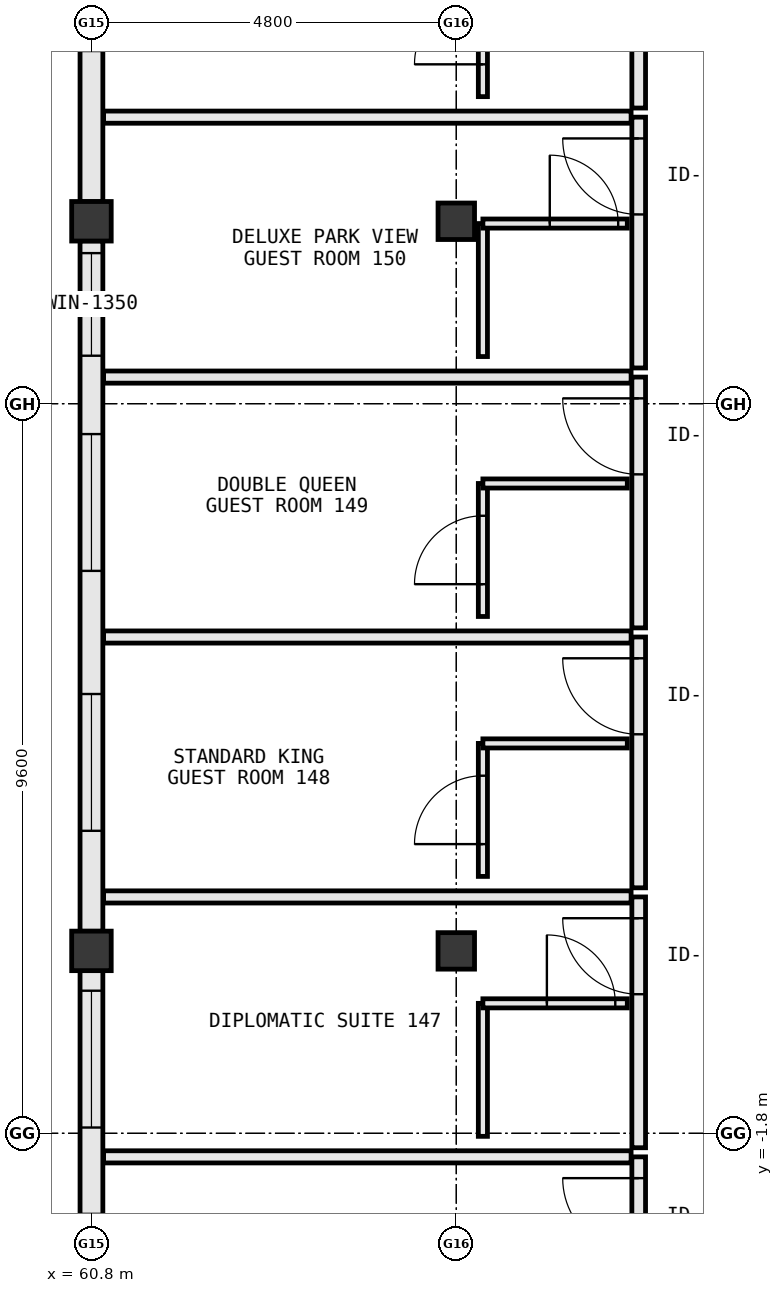
"""IFC4 building model, lengths in metres.
Left out: names, types, materials, properties, quantities, classifications, styles, units other than length and angle.
Written with IfcOpenShell. Run it as: python <this file> out.ifc"""

import sys

from ifc_helpers import new_model, si_unit, direction, frame, frame_2d, origin, origin_2d, place, context, subcontext, project, spatial, rectangle, extrude, element, fill, save


model = new_model("IFC4")
c1 = context("Model", 3, precision=1e-05, world=origin(), true_north=direction((0.0, 1.0)))
c2 = subcontext(c1, "Body", "Model", "MODEL_VIEW")
j1 = project(units=[si_unit("LENGTHUNIT", "METRE"), si_unit("PLANEANGLEUNIT", "RADIAN")], contexts=[c1])
p1 = place(None, origin())
s1 = spatial("IfcSite", under=j1, at=p1, CompositionType="ELEMENT")
p2 = place(p1, origin())
s2 = spatial("IfcBuilding", under=s1, at=p2, CompositionType="ELEMENT")
p3 = place(p2, frame((0.0, 0.0, 23.8)))
s3 = spatial("IfcBuildingStorey", under=s2, at=p3, CompositionType="ELEMENT", Elevation=23.8)
for number, where, z_axis, x_axis in (
    (1, (60.8, 0.6, 0.0), (0.0, 0.0, 1.0), (1.0, 0.0, 0.0)),
    (2, (60.8, 10.2, 0.0), (0.0, 0.0, 1.0), (1.0, 0.0, 0.0)),
):
    element("IfcColumn", number, at=place(p3, frame(where, z_axis=z_axis, x_axis=x_axis)), inside=s3, PredefinedType="COLUMN", context=c2, shape_type="SweptSolid", body=[
        extrude(rectangle(XDim=0.52, YDim=0.52, at=origin_2d()), origin(), (0.0, 0.0, 1.0), 3.8),
    ])
for number, where, z_axis, x_axis in (
    (3, (65.6, 0.6, 0.0), (0.0, 0.0, 1.0), (1.0, 0.0, 0.0)),
    (4, (65.6, 10.2, 0.0), (0.0, 0.0, 1.0), (1.0, 0.0, 0.0)),
):
    element("IfcColumn", number, at=place(p3, frame(where, z_axis=z_axis, x_axis=x_axis)), inside=s3, PredefinedType="COLUMN", context=c2, shape_type="SweptSolid", body=[
        extrude(rectangle(XDim=0.48, YDim=0.48, at=origin_2d()), origin(), (0.0, 0.0, 1.0), 3.8),
    ])
p4 = place(p3, frame((60.8, 18.342, 0.0), z_axis=(0.0, 0.0, 1.0), x_axis=(0.0, -1.0, 0.0)))
e5 = element("IfcWall", 5, at=p4, inside=s3, PredefinedType="STANDARD", context=c2, shape_type="SweptSolid", body=[
    extrude(rectangle(XDim=7.884, YDim=0.3, at=frame_2d((3.942, 0.0))), origin(), (0.0, 0.0, 1.0), 3.005),
])
p5 = place(p4, frame((4.102, 0.0, 0.85)))
e6 = element("IfcOpeningElement", 6, at=p5, cuts=e5, PredefinedType="OPENING", context=c2, shape_type="SweptSolid", body=[
    extrude(rectangle(XDim=1.8, YDim=1.85, at=frame_2d((0.9, 0.925))), frame((0.0, 0.162, 0.0), z_axis=(0.0, -1.0, 0.0), x_axis=(1.0, 0.0, 0.0)), (0.0, 0.0, 1.0), 0.324),
])
p6 = place(p4, frame((0.716, 0.0, 0.85)))
e7 = element("IfcOpeningElement", 7, at=p6, cuts=e5, PredefinedType="OPENING", context=c2, shape_type="SweptSolid", body=[
    extrude(rectangle(XDim=1.8, YDim=1.85, at=frame_2d((0.9, 0.925))), frame((0.0, 0.162, 0.0), z_axis=(0.0, -1.0, 0.0), x_axis=(1.0, 0.0, 0.0)), (0.0, 0.0, 1.0), 0.324),
])
p7 = place(p3, frame((60.8, 9.942, 0.0), z_axis=(0.0, 0.0, 1.0), x_axis=(0.0, -1.0, 0.0)))
e8 = element("IfcWall", 8, at=p7, inside=s3, PredefinedType="STANDARD", context=c2, shape_type="SweptSolid", body=[
    extrude(rectangle(XDim=9.084, YDim=0.3, at=frame_2d((4.542, 0.0))), origin(), (0.0, 0.0, 1.0), 2.905),
])
p8 = place(p7, frame((5.962, 0.0, 0.85)))
e9 = element("IfcOpeningElement", 9, at=p8, cuts=e8, PredefinedType="OPENING", context=c2, shape_type="SweptSolid", body=[
    extrude(rectangle(XDim=1.8, YDim=1.85, at=frame_2d((0.9, 0.925))), frame((0.0, 0.162, 0.0), z_axis=(0.0, -1.0, 0.0), x_axis=(1.0, 0.0, 0.0)), (0.0, 0.0, 1.0), 0.324),
])
p9 = place(p7, frame((2.542, 0.0, 0.85)))
e10 = element("IfcOpeningElement", 10, at=p9, cuts=e8, PredefinedType="OPENING", context=c2, shape_type="SweptSolid", body=[
    extrude(rectangle(XDim=1.8, YDim=1.85, at=frame_2d((0.9, 0.925))), frame((0.0, 0.162, 0.0), z_axis=(0.0, -1.0, 0.0), x_axis=(1.0, 0.0, 0.0)), (0.0, 0.0, 1.0), 0.324),
])
p10 = place(p7, frame((0.161, 0.0, 0.85)))
e11 = element("IfcOpeningElement", 11, at=p10, cuts=e8, PredefinedType="OPENING", context=c2, shape_type="SweptSolid", body=[
    extrude(rectangle(XDim=1.35, YDim=1.65, at=frame_2d((0.675, 0.825))), frame((0.0, 0.162, 0.0), z_axis=(0.0, -1.0, 0.0), x_axis=(1.0, 0.0, 0.0)), (0.0, 0.0, 1.0), 0.324),
])
p11 = place(p3, frame((60.8, 0.342, 0.0), z_axis=(0.0, 0.0, 1.0), x_axis=(0.0, -1.0, 0.0)))
e12 = element("IfcWall", 12, at=p11, inside=s3, PredefinedType="STANDARD", context=c2, shape_type="SweptSolid", body=[
    extrude(rectangle(XDim=9.084, YDim=0.3, at=frame_2d((4.542, 0.0))), origin(), (0.0, 0.0, 1.0), 2.905),
])
p12 = place(p11, frame((6.578, 0.0, 0.85)))
e13 = element("IfcOpeningElement", 13, at=p12, cuts=e12, PredefinedType="OPENING", context=c2, shape_type="SweptSolid", body=[
    extrude(rectangle(XDim=1.8, YDim=1.85, at=frame_2d((0.9, 0.925))), frame((0.0, 0.162, 0.0), z_axis=(0.0, -1.0, 0.0), x_axis=(1.0, 0.0, 0.0)), (0.0, 0.0, 1.0), 0.324),
])
p13 = place(p11, frame((3.202, 0.0, 0.85)))
e14 = element("IfcOpeningElement", 14, at=p13, cuts=e12, PredefinedType="OPENING", context=c2, shape_type="SweptSolid", body=[
    extrude(rectangle(XDim=1.8, YDim=1.85, at=frame_2d((0.9, 0.925))), frame((0.0, 0.162, 0.0), z_axis=(0.0, -1.0, 0.0), x_axis=(1.0, 0.0, 0.0)), (0.0, 0.0, 1.0), 0.324),
])
p14 = place(p11, frame((0.266, 0.0, 0.85)))
e15 = element("IfcOpeningElement", 15, at=p14, cuts=e12, PredefinedType="OPENING", context=c2, shape_type="SweptSolid", body=[
    extrude(rectangle(XDim=1.8, YDim=1.85, at=frame_2d((0.9, 0.925))), frame((0.0, 0.162, 0.0), z_axis=(0.0, -1.0, 0.0), x_axis=(1.0, 0.0, 0.0)), (0.0, 0.0, 1.0), 0.324),
])
p15 = place(p3, frame((68.0, -5.41, 0.0), z_axis=(0.0, 0.0, 1.0), x_axis=(0.0, 1.0, 0.0)))
e16 = element("IfcWall", 16, at=p15, inside=s3, PredefinedType="PARTITIONING", context=c2, shape_type="SweptSolid", body=[
    extrude(rectangle(XDim=3.3, YDim=0.18, at=frame_2d((1.65, 0.0))), origin(), (0.0, 0.0, 1.0), 3.55),
])
p16 = place(p15, frame((2.02, 0.0, 0.0)))
e17 = element("IfcOpeningElement", 17, at=p16, cuts=e16, PredefinedType="OPENING", context=c2, shape_type="SweptSolid", body=[
    extrude(rectangle(XDim=1.0, YDim=2.2, at=frame_2d((0.5, 1.1))), frame((0.0, 0.102, 0.0), z_axis=(0.0, -1.0, 0.0), x_axis=(1.0, 0.0, 0.0)), (0.0, 0.0, 1.0), 0.204),
])
p17 = place(p3, frame((60.96, -2.11, 0.0), z_axis=(0.0, 0.0, 1.0), x_axis=(1.0, 0.0, 0.0)))
e18 = element("IfcWall", 18, at=p17, inside=s3, PredefinedType="PARTITIONING", context=c2, shape_type="SweptSolid", body=[
    extrude(rectangle(XDim=6.94, YDim=0.16, at=frame_2d((3.47, 0.0))), origin(), (0.0, 0.0, 1.0), 3.55),
])
p18 = place(p3, frame((68.0, -1.99, 0.0), z_axis=(0.0, 0.0, 1.0), x_axis=(0.0, 1.0, 0.0)))
e19 = element("IfcWall", 19, at=p18, inside=s3, PredefinedType="PARTITIONING", context=c2, shape_type="SweptSolid", body=[
    extrude(rectangle(XDim=3.3, YDim=0.18, at=frame_2d((1.65, 0.0))), origin(), (0.0, 0.0, 1.0), 3.55),
])
p19 = place(p18, frame((2.02, 0.0, 0.0)))
e20 = element("IfcOpeningElement", 20, at=p19, cuts=e19, PredefinedType="OPENING", context=c2, shape_type="SweptSolid", body=[
    extrude(rectangle(XDim=1.0, YDim=2.2, at=frame_2d((0.5, 1.1))), frame((0.0, 0.102, 0.0), z_axis=(0.0, -1.0, 0.0), x_axis=(1.0, 0.0, 0.0)), (0.0, 0.0, 1.0), 0.204),
])
p20 = place(p3, frame((60.96, 1.31, 0.0), z_axis=(0.0, 0.0, 1.0), x_axis=(1.0, 0.0, 0.0)))
e21 = element("IfcWall", 21, at=p20, inside=s3, PredefinedType="PARTITIONING", context=c2, shape_type="SweptSolid", body=[
    extrude(rectangle(XDim=6.94, YDim=0.16, at=frame_2d((3.47, 0.0))), origin(), (0.0, 0.0, 1.0), 3.55),
])
p21 = place(p3, frame((65.95, -1.84, 0.0), z_axis=(0.0, 0.0, 1.0), x_axis=(0.0, 1.0, 0.0)))
e22 = element("IfcWall", 22, at=p21, inside=s3, PredefinedType="PARTITIONING", context=c2, shape_type="SweptSolid", body=[
    extrude(rectangle(XDim=1.75, YDim=0.12, at=frame_2d((0.875, 0.0))), origin(), (0.0, 0.0, 1.0), 2.905),
])
p22 = place(p3, frame((65.95, -0.09, 0.0), z_axis=(0.0, 0.0, 1.0), x_axis=(1.0, 0.0, 0.0)))
e23 = element("IfcWall", 23, at=p22, inside=s3, PredefinedType="PARTITIONING", context=c2, shape_type="SweptSolid", body=[
    extrude(rectangle(XDim=1.9, YDim=0.12, at=frame_2d((0.95, 0.0))), origin(), (0.0, 0.0, 1.0), 3.55),
])
p23 = place(p22, frame((0.842, 0.0, 0.0)))
e24 = element("IfcOpeningElement", 24, at=p23, cuts=e23, PredefinedType="OPENING", context=c2, shape_type="SweptSolid", body=[
    extrude(rectangle(XDim=0.9, YDim=2.15, at=frame_2d((0.45, 1.075))), frame((0.0, 0.072, 0.0), z_axis=(0.0, -1.0, 0.0), x_axis=(1.0, 0.0, 0.0)), (0.0, 0.0, 1.0), 0.144),
])
p24 = place(p3, frame((68.0, 1.43, 0.0), z_axis=(0.0, 0.0, 1.0), x_axis=(0.0, 1.0, 0.0)))
e25 = element("IfcWall", 25, at=p24, inside=s3, PredefinedType="PARTITIONING", context=c2, shape_type="SweptSolid", body=[
    extrude(rectangle(XDim=3.3, YDim=0.18, at=frame_2d((1.65, 0.0))), origin(), (0.0, 0.0, 1.0), 3.55),
])
p25 = place(p24, frame((2.02, 0.0, 0.0)))
e26 = element("IfcOpeningElement", 26, at=p25, cuts=e25, PredefinedType="OPENING", context=c2, shape_type="SweptSolid", body=[
    extrude(rectangle(XDim=1.0, YDim=2.2, at=frame_2d((0.5, 1.1))), frame((0.0, 0.102, 0.0), z_axis=(0.0, -1.0, 0.0), x_axis=(1.0, 0.0, 0.0)), (0.0, 0.0, 1.0), 0.204),
])
p26 = place(p3, frame((60.96, 4.73, 0.0), z_axis=(0.0, 0.0, 1.0), x_axis=(1.0, 0.0, 0.0)))
e27 = element("IfcWall", 27, at=p26, inside=s3, PredefinedType="PARTITIONING", context=c2, shape_type="SweptSolid", body=[
    extrude(rectangle(XDim=6.94, YDim=0.16, at=frame_2d((3.47, 0.0))), origin(), (0.0, 0.0, 1.0), 3.55),
])
p27 = place(p3, frame((65.95, 1.58, 0.0), z_axis=(0.0, 0.0, 1.0), x_axis=(0.0, 1.0, 0.0)))
e28 = element("IfcWall", 28, at=p27, inside=s3, PredefinedType="PARTITIONING", context=c2, shape_type="SweptSolid", body=[
    extrude(rectangle(XDim=1.75, YDim=0.12, at=frame_2d((0.875, 0.0))), origin(), (0.0, 0.0, 1.0), 2.905),
])
p28 = place(p27, frame((0.425, 0.0, 0.0)))
e29 = element("IfcOpeningElement", 29, at=p28, cuts=e28, PredefinedType="OPENING", context=c2, shape_type="SweptSolid", body=[
    extrude(rectangle(XDim=0.9, YDim=2.15, at=frame_2d((0.45, 1.075))), frame((0.0, 0.072, 0.0), z_axis=(0.0, -1.0, 0.0), x_axis=(1.0, 0.0, 0.0)), (0.0, 0.0, 1.0), 0.144),
])
p29 = place(p3, frame((65.95, 3.33, 0.0), z_axis=(0.0, 0.0, 1.0), x_axis=(1.0, 0.0, 0.0)))
e30 = element("IfcWall", 30, at=p29, inside=s3, PredefinedType="PARTITIONING", context=c2, shape_type="SweptSolid", body=[
    extrude(rectangle(XDim=1.9, YDim=0.12, at=frame_2d((0.95, 0.0))), origin(), (0.0, 0.0, 1.0), 3.55),
])
p30 = place(p3, frame((68.0, 4.85, 0.0), z_axis=(0.0, 0.0, 1.0), x_axis=(0.0, 1.0, 0.0)))
e31 = element("IfcWall", 31, at=p30, inside=s3, PredefinedType="PARTITIONING", context=c2, shape_type="SweptSolid", body=[
    extrude(rectangle(XDim=3.3, YDim=0.18, at=frame_2d((1.65, 0.0))), origin(), (0.0, 0.0, 1.0), 3.55),
])
p31 = place(p30, frame((2.02, 0.0, 0.0)))
e32 = element("IfcOpeningElement", 32, at=p31, cuts=e31, PredefinedType="OPENING", context=c2, shape_type="SweptSolid", body=[
    extrude(rectangle(XDim=1.0, YDim=2.2, at=frame_2d((0.5, 1.1))), frame((0.0, 0.102, 0.0), z_axis=(0.0, -1.0, 0.0), x_axis=(1.0, 0.0, 0.0)), (0.0, 0.0, 1.0), 0.204),
])
p32 = place(p3, frame((60.96, 8.15, 0.0), z_axis=(0.0, 0.0, 1.0), x_axis=(1.0, 0.0, 0.0)))
e33 = element("IfcWall", 33, at=p32, inside=s3, PredefinedType="PARTITIONING", context=c2, shape_type="SweptSolid", body=[
    extrude(rectangle(XDim=6.94, YDim=0.16, at=frame_2d((3.47, 0.0))), origin(), (0.0, 0.0, 1.0), 3.55),
])
p33 = place(p3, frame((65.95, 5.0, 0.0), z_axis=(0.0, 0.0, 1.0), x_axis=(0.0, 1.0, 0.0)))
e34 = element("IfcWall", 34, at=p33, inside=s3, PredefinedType="PARTITIONING", context=c2, shape_type="SweptSolid", body=[
    extrude(rectangle(XDim=1.75, YDim=0.12, at=frame_2d((0.875, 0.0))), origin(), (0.0, 0.0, 1.0), 2.905),
])
p34 = place(p33, frame((0.425, 0.0, 0.0)))
e35 = element("IfcOpeningElement", 35, at=p34, cuts=e34, PredefinedType="OPENING", context=c2, shape_type="SweptSolid", body=[
    extrude(rectangle(XDim=0.9, YDim=2.15, at=frame_2d((0.45, 1.075))), frame((0.0, 0.072, 0.0), z_axis=(0.0, -1.0, 0.0), x_axis=(1.0, 0.0, 0.0)), (0.0, 0.0, 1.0), 0.144),
])
p35 = place(p3, frame((65.95, 6.75, 0.0), z_axis=(0.0, 0.0, 1.0), x_axis=(1.0, 0.0, 0.0)))
e36 = element("IfcWall", 36, at=p35, inside=s3, PredefinedType="PARTITIONING", context=c2, shape_type="SweptSolid", body=[
    extrude(rectangle(XDim=1.9, YDim=0.12, at=frame_2d((0.95, 0.0))), origin(), (0.0, 0.0, 1.0), 3.55),
])
p36 = place(p3, frame((68.0, 8.27, 0.0), z_axis=(0.0, 0.0, 1.0), x_axis=(0.0, 1.0, 0.0)))
e37 = element("IfcWall", 37, at=p36, inside=s3, PredefinedType="PARTITIONING", context=c2, shape_type="SweptSolid", body=[
    extrude(rectangle(XDim=3.3, YDim=0.18, at=frame_2d((1.65, 0.0))), origin(), (0.0, 0.0, 1.0), 3.55),
])
p37 = place(p36, frame((2.02, 0.0, 0.0)))
e38 = element("IfcOpeningElement", 38, at=p37, cuts=e37, PredefinedType="OPENING", context=c2, shape_type="SweptSolid", body=[
    extrude(rectangle(XDim=1.0, YDim=2.2, at=frame_2d((0.5, 1.1))), frame((0.0, 0.102, 0.0), z_axis=(0.0, -1.0, 0.0), x_axis=(1.0, 0.0, 0.0)), (0.0, 0.0, 1.0), 0.204),
])
p38 = place(p3, frame((60.96, 11.57, 0.0), z_axis=(0.0, 0.0, 1.0), x_axis=(1.0, 0.0, 0.0)))
e39 = element("IfcWall", 39, at=p38, inside=s3, PredefinedType="PARTITIONING", context=c2, shape_type="SweptSolid", body=[
    extrude(rectangle(XDim=6.94, YDim=0.16, at=frame_2d((3.47, 0.0))), origin(), (0.0, 0.0, 1.0), 3.55),
])
p39 = place(p3, frame((65.95, 8.42, 0.0), z_axis=(0.0, 0.0, 1.0), x_axis=(0.0, 1.0, 0.0)))
e40 = element("IfcWall", 40, at=p39, inside=s3, PredefinedType="PARTITIONING", context=c2, shape_type="SweptSolid", body=[
    extrude(rectangle(XDim=1.75, YDim=0.12, at=frame_2d((0.875, 0.0))), origin(), (0.0, 0.0, 1.0), 2.905),
])
p40 = place(p3, frame((65.95, 10.17, 0.0), z_axis=(0.0, 0.0, 1.0), x_axis=(1.0, 0.0, 0.0)))
e41 = element("IfcWall", 41, at=p40, inside=s3, PredefinedType="PARTITIONING", context=c2, shape_type="SweptSolid", body=[
    extrude(rectangle(XDim=1.9, YDim=0.12, at=frame_2d((0.95, 0.0))), origin(), (0.0, 0.0, 1.0), 2.905),
])
p41 = place(p40, frame((0.88, 0.0, 0.0)))
e42 = element("IfcOpeningElement", 42, at=p41, cuts=e41, PredefinedType="OPENING", context=c2, shape_type="SweptSolid", body=[
    extrude(rectangle(XDim=0.9, YDim=2.15, at=frame_2d((0.45, 1.075))), frame((0.0, 0.072, 0.0), z_axis=(0.0, -1.0, 0.0), x_axis=(1.0, 0.0, 0.0)), (0.0, 0.0, 1.0), 0.144),
])
p42 = place(p3, frame((68.0, 11.69, 0.0), z_axis=(0.0, 0.0, 1.0), x_axis=(0.0, 1.0, 0.0)))
e43 = element("IfcWall", 43, at=p42, inside=s3, PredefinedType="PARTITIONING", context=c2, shape_type="SweptSolid", body=[
    extrude(rectangle(XDim=3.3, YDim=0.18, at=frame_2d((1.65, 0.0))), origin(), (0.0, 0.0, 1.0), 3.55),
])
p43 = place(p42, frame((2.02, 0.0, 0.0)))
e44 = element("IfcOpeningElement", 44, at=p43, cuts=e43, PredefinedType="OPENING", context=c2, shape_type="SweptSolid", body=[
    extrude(rectangle(XDim=1.0, YDim=2.2, at=frame_2d((0.5, 1.1))), frame((0.0, 0.102, 0.0), z_axis=(0.0, -1.0, 0.0), x_axis=(1.0, 0.0, 0.0)), (0.0, 0.0, 1.0), 0.204),
])
p44 = place(p3, frame((65.95, 11.84, 0.0), z_axis=(0.0, 0.0, 1.0), x_axis=(0.0, 1.0, 0.0)))
e45 = element("IfcWall", 45, at=p44, inside=s3, PredefinedType="PARTITIONING", context=c2, shape_type="SweptSolid", body=[
    extrude(rectangle(XDim=1.75, YDim=0.12, at=frame_2d((0.875, 0.0))), origin(), (0.0, 0.0, 1.0), 3.005),
])
p45 = place(p44, frame((0.425, 0.0, 0.0)))
e46 = element("IfcOpeningElement", 46, at=p45, cuts=e45, PredefinedType="OPENING", context=c2, shape_type="SweptSolid", body=[
    extrude(rectangle(XDim=0.9, YDim=2.15, at=frame_2d((0.45, 1.075))), frame((0.0, 0.072, 0.0), z_axis=(0.0, -1.0, 0.0), x_axis=(1.0, 0.0, 0.0)), (0.0, 0.0, 1.0), 0.144),
])
p46 = place(p14, origin())
e47 = element("IfcWindow", 47, at=p46, inside=s3, PartitioningType="SINGLE_PANEL", PredefinedType="WINDOW", context=c2, shape_type="SweptSolid", body=[
    extrude(rectangle(XDim=1.8, YDim=1.85, at=frame_2d((0.9, 0.925))), frame((0.0, 0.03, 0.0), z_axis=(0.0, -1.0, 0.0), x_axis=(1.0, 0.0, 0.0)), (0.0, 0.0, 1.0), 0.06),
])
fill(e15, e47)
p47 = place(p8, origin())
e48 = element("IfcWindow", 48, at=p47, inside=s3, PartitioningType="SINGLE_PANEL", PredefinedType="WINDOW", context=c2, shape_type="SweptSolid", body=[
    extrude(rectangle(XDim=1.8, YDim=1.85, at=frame_2d((0.9, 0.925))), frame((0.0, 0.03, 0.0), z_axis=(0.0, -1.0, 0.0), x_axis=(1.0, 0.0, 0.0)), (0.0, 0.0, 1.0), 0.06),
])
fill(e9, e48)
p48 = place(p9, origin())
e49 = element("IfcWindow", 49, at=p48, inside=s3, PartitioningType="SINGLE_PANEL", PredefinedType="WINDOW", context=c2, shape_type="SweptSolid", body=[
    extrude(rectangle(XDim=1.8, YDim=1.85, at=frame_2d((0.9, 0.925))), frame((0.0, 0.03, 0.0), z_axis=(0.0, -1.0, 0.0), x_axis=(1.0, 0.0, 0.0)), (0.0, 0.0, 1.0), 0.06),
])
fill(e10, e49)
p49 = place(p10, origin())
e50 = element("IfcWindow", 50, at=p49, inside=s3, PartitioningType="SINGLE_PANEL", PredefinedType="WINDOW", context=c2, shape_type="SweptSolid", body=[
    extrude(rectangle(XDim=1.35, YDim=1.65, at=frame_2d((0.675, 0.825))), frame((0.0, 0.03, 0.0), z_axis=(0.0, -1.0, 0.0), x_axis=(1.0, 0.0, 0.0)), (0.0, 0.0, 1.0), 0.06),
])
fill(e11, e50)
p50 = place(p16, origin())
e51 = element("IfcDoor", 51, at=p50, inside=s3, OperationType="SINGLE_SWING_RIGHT", PredefinedType="DOOR", context=c2, shape_type="SweptSolid", body=[
    extrude(rectangle(XDim=1.0, YDim=2.2, at=frame_2d((0.5, 1.1))), frame((0.0, 0.025, 0.0), z_axis=(0.0, -1.0, 0.0), x_axis=(1.0, 0.0, 0.0)), (0.0, 0.0, 1.0), 0.05),
])
fill(e17, e51)
p51 = place(p19, origin())
e52 = element("IfcDoor", 52, at=p51, inside=s3, OperationType="SINGLE_SWING_RIGHT", PredefinedType="DOOR", context=c2, shape_type="SweptSolid", body=[
    extrude(rectangle(XDim=1.0, YDim=2.2, at=frame_2d((0.5, 1.1))), frame((0.0, 0.025, 0.0), z_axis=(0.0, -1.0, 0.0), x_axis=(1.0, 0.0, 0.0)), (0.0, 0.0, 1.0), 0.05),
])
fill(e20, e52)
p52 = place(p23, origin())
e53 = element("IfcDoor", 53, at=p52, inside=s3, OperationType="SINGLE_SWING_LEFT", PredefinedType="DOOR", context=c2, shape_type="SweptSolid", body=[
    extrude(rectangle(XDim=0.9, YDim=2.15, at=frame_2d((0.45, 1.075))), frame((0.0, 0.025, 0.0), z_axis=(0.0, -1.0, 0.0), x_axis=(1.0, 0.0, 0.0)), (0.0, 0.0, 1.0), 0.05),
])
fill(e24, e53)
p53 = place(p25, origin())
e54 = element("IfcDoor", 54, at=p53, inside=s3, OperationType="SINGLE_SWING_RIGHT", PredefinedType="DOOR", context=c2, shape_type="SweptSolid", body=[
    extrude(rectangle(XDim=1.0, YDim=2.2, at=frame_2d((0.5, 1.1))), frame((0.0, 0.025, 0.0), z_axis=(0.0, -1.0, 0.0), x_axis=(1.0, 0.0, 0.0)), (0.0, 0.0, 1.0), 0.05),
])
fill(e26, e54)
p54 = place(p28, origin())
e55 = element("IfcDoor", 55, at=p54, inside=s3, OperationType="SINGLE_SWING_LEFT", PredefinedType="DOOR", context=c2, shape_type="SweptSolid", body=[
    extrude(rectangle(XDim=0.9, YDim=2.15, at=frame_2d((0.45, 1.075))), frame((0.0, 0.025, 0.0), z_axis=(0.0, -1.0, 0.0), x_axis=(1.0, 0.0, 0.0)), (0.0, 0.0, 1.0), 0.05),
])
fill(e29, e55)
p55 = place(p31, origin())
e56 = element("IfcDoor", 56, at=p55, inside=s3, OperationType="SINGLE_SWING_RIGHT", PredefinedType="DOOR", context=c2, shape_type="SweptSolid", body=[
    extrude(rectangle(XDim=1.0, YDim=2.2, at=frame_2d((0.5, 1.1))), frame((0.0, 0.025, 0.0), z_axis=(0.0, -1.0, 0.0), x_axis=(1.0, 0.0, 0.0)), (0.0, 0.0, 1.0), 0.05),
])
fill(e32, e56)
p56 = place(p34, origin())
e57 = element("IfcDoor", 57, at=p56, inside=s3, OperationType="SINGLE_SWING_LEFT", PredefinedType="DOOR", context=c2, shape_type="SweptSolid", body=[
    extrude(rectangle(XDim=0.9, YDim=2.15, at=frame_2d((0.45, 1.075))), frame((0.0, 0.025, 0.0), z_axis=(0.0, -1.0, 0.0), x_axis=(1.0, 0.0, 0.0)), (0.0, 0.0, 1.0), 0.05),
])
fill(e35, e57)
p57 = place(p37, origin())
e58 = element("IfcDoor", 58, at=p57, inside=s3, OperationType="SINGLE_SWING_RIGHT", PredefinedType="DOOR", context=c2, shape_type="SweptSolid", body=[
    extrude(rectangle(XDim=1.0, YDim=2.2, at=frame_2d((0.5, 1.1))), frame((0.0, 0.025, 0.0), z_axis=(0.0, -1.0, 0.0), x_axis=(1.0, 0.0, 0.0)), (0.0, 0.0, 1.0), 0.05),
])
fill(e38, e58)
p58 = place(p41, origin())
e59 = element("IfcDoor", 59, at=p58, inside=s3, OperationType="SINGLE_SWING_LEFT", PredefinedType="DOOR", context=c2, shape_type="SweptSolid", body=[
    extrude(rectangle(XDim=0.9, YDim=2.15, at=frame_2d((0.45, 1.075))), frame((0.0, 0.025, 0.0), z_axis=(0.0, -1.0, 0.0), x_axis=(1.0, 0.0, 0.0)), (0.0, 0.0, 1.0), 0.05),
])
fill(e42, e59)
p59 = place(p45, origin())
e60 = element("IfcDoor", 60, at=p59, inside=s3, OperationType="SINGLE_SWING_LEFT", PredefinedType="DOOR", context=c2, shape_type="SweptSolid", body=[
    extrude(rectangle(XDim=0.9, YDim=2.15, at=frame_2d((0.45, 1.075))), frame((0.0, 0.025, 0.0), z_axis=(0.0, -1.0, 0.0), x_axis=(1.0, 0.0, 0.0)), (0.0, 0.0, 1.0), 0.05),
])
fill(e46, e60)
save(model, sys.argv[1])
